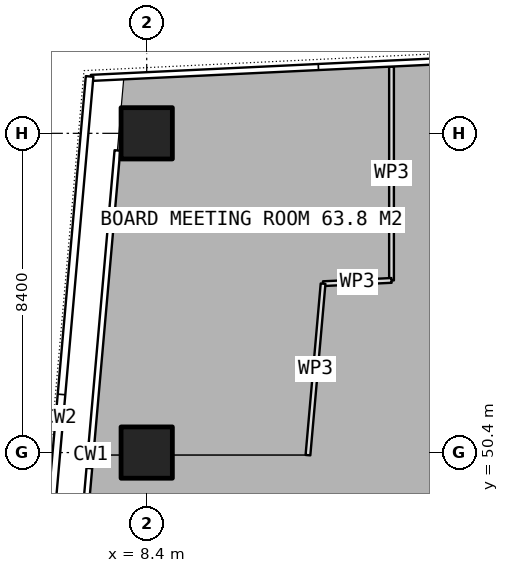
"""IFC4 building model, lengths in metres.
Left out: names, types, materials, properties, quantities, classifications, styles, units other than length and angle.
Written with IfcOpenShell. Run it as: python <this file> out.ifc"""

import sys

from ifc_helpers import new_model, si_unit, direction, frame, frame_2d, origin, origin_2d, place, context, subcontext, project, spatial, rectangle, extrude, element, save


model = new_model("IFC4")
c1 = context("Model", 3, precision=1e-05, world=origin(), true_north=direction((0.0, 1.0)))
c2 = subcontext(c1, "Body", "Model", "MODEL_VIEW")
j1 = project(units=[si_unit("LENGTHUNIT", "METRE"), si_unit("PLANEANGLEUNIT", "RADIAN")], contexts=[c1])
p1 = place(None, origin())
s1 = spatial("IfcSite", under=j1, at=p1, CompositionType="ELEMENT")
p2 = place(p1, origin())
s2 = spatial("IfcBuilding", under=s1, at=p2, CompositionType="ELEMENT")
p3 = place(p2, frame((0.0, 0.0, 213.95)))
s3 = spatial("IfcBuildingStorey", under=s2, at=p3, CompositionType="ELEMENT", Elevation=213.95)
for number, where, z_axis, x_axis in (
    (1, (8.4, 50.4, 0.0), (0.0, 0.0, 1.0), (1.0, 0.0, 0.0)),
    (2, (8.4, 58.8, 0.0), (0.0, 0.0, 1.0), (1.0, 0.0, 0.0)),
):
    element("IfcColumn", number, at=place(p3, frame(where, z_axis=z_axis, x_axis=x_axis)), inside=s3, PredefinedType="COLUMN", context=c2, shape_type="SweptSolid", body=[
        extrude(rectangle(XDim=1.35, YDim=1.35, at=origin_2d()), origin(), (0.0, 0.0, 1.0), 3.75),
    ])
p4 = place(p3, frame((14.842, 60.557, 0.0), z_axis=(0.0, 0.0, 1.0), x_axis=(0.0, -1.0, 0.0)))
e3 = element("IfcWall", 3, at=p4, inside=s3, PredefinedType="PARTITIONING", context=c2, shape_type="SweptSolid", body=[
    extrude(rectangle(XDim=5.627, YDim=0.125, at=frame_2d((2.813, 0.0))), origin(), (0.0, 0.0, 1.0), 3.5),
])
p5 = place(p3, frame((14.842, 54.93, 0.0), z_axis=(0.0, 0.0, 1.0), x_axis=(-0.998863537959, -0.047661646382, 0.0)))
e4 = element("IfcWall", 4, at=p5, inside=s3, PredefinedType="PARTITIONING", context=c2, shape_type="SweptSolid", body=[
    extrude(rectangle(XDim=1.803, YDim=0.125, at=frame_2d((0.901, 0.0))), origin(), (0.0, 0.0, 1.0), 3.5),
])
p6 = place(p3, frame((13.041, 54.844, 0.0), z_axis=(0.0, 0.0, 1.0), x_axis=(-0.087857629893, -0.996133041752, 0.0)))
e5 = element("IfcWall", 5, at=p6, inside=s3, PredefinedType="PARTITIONING", context=c2, shape_type="SweptSolid", body=[
    extrude(rectangle(XDim=4.53, YDim=0.125, at=frame_2d((2.265, 0.0))), origin(), (0.0, 0.0, 1.0), 3.5),
])
save(model, sys.argv[1])
